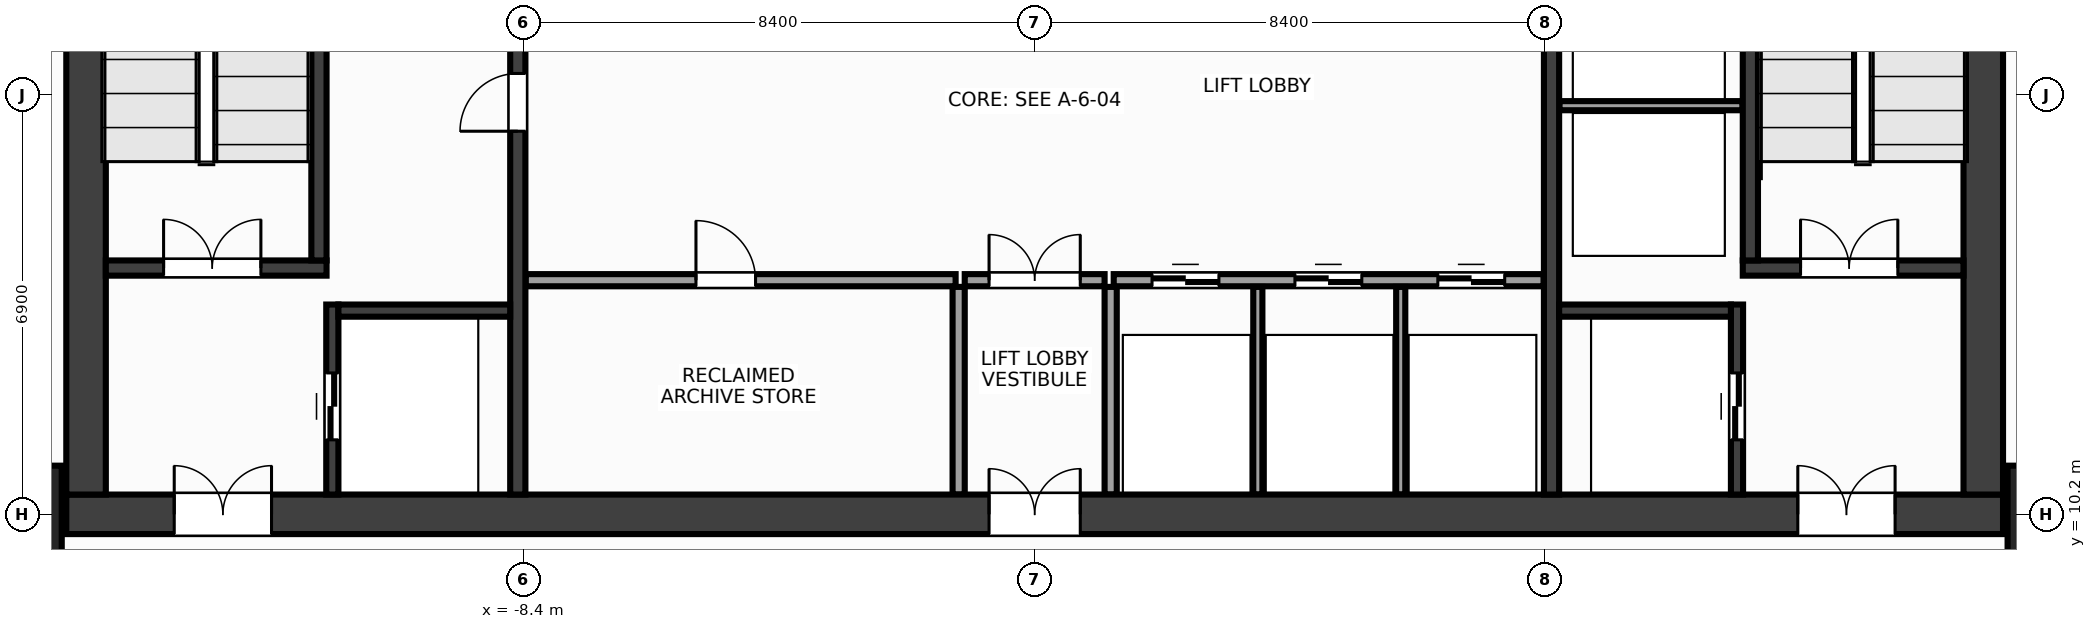
"""IFC4 building model, lengths in metres.
Left out: names, types, materials, properties, quantities, classifications, styles, units other than length and angle.
Written with IfcOpenShell. Run it as: python <this file> out.ifc"""

import sys

from ifc_helpers import new_model, si_unit, direction, frame, frame_2d, origin, origin_2d, place, context, subcontext, project, spatial, rectangle, extrude, source, transform, mapped, element, fill, save


model = new_model("IFC4")
c1 = context("Model", 3, precision=1e-05, world=origin(), true_north=direction((0.0, 1.0)))
c2 = subcontext(c1, "Body", "Model", "MODEL_VIEW")
j1 = project(units=[si_unit("LENGTHUNIT", "METRE"), si_unit("PLANEANGLEUNIT", "RADIAN")], contexts=[c1])
p1 = place(None, origin())
s1 = spatial("IfcSite", under=j1, at=p1, CompositionType="ELEMENT")
p2 = place(p1, origin())
s2 = spatial("IfcBuilding", under=s1, at=p2, CompositionType="ELEMENT")
p3 = place(p2, frame((0.0, 0.0, 106.4)))
s3 = spatial("IfcBuildingStorey", under=s2, at=p3, CompositionType="ELEMENT", Elevation=106.4)
m1 = source(origin(), c2, "Body", "SweptSolid", [
    extrude(rectangle(XDim=31.85, YDim=0.65, at=frame_2d((15.925, 0.0))), origin(), (0.0, 0.0, 1.0), 3.6),
])
p4 = place(p3, frame((-15.925, 10.2, 0.0), z_axis=(0.0, 0.0, 1.0), x_axis=(1.0, 0.0, 0.0)))
e1 = element("IfcWall", 1, at=p4, inside=s3, PredefinedType="SHEAR", context=c2, shape_type="MappedRepresentation", body=[
    mapped(m1, transform((0.0, 0.0, 0.0), x_axis=(1.0, 0.0, 0.0), y_axis=(0.0, 1.0, 0.0), z_axis=(0.0, 0.0, 1.0), scale=1.0)),
])
p5 = place(p4, frame((1.775, 0.0, 0.0)))
e2 = element("IfcOpeningElement", 2, at=p5, cuts=e1, PredefinedType="OPENING", context=c2, shape_type="SweptSolid", body=[
    extrude(rectangle(XDim=1.6, YDim=2.15, at=frame_2d((0.8, 1.075))), frame((0.0, 0.337, 0.0), z_axis=(0.0, -1.0, 0.0), x_axis=(1.0, 0.0, 0.0)), (0.0, 0.0, 1.0), 0.674),
])
p6 = place(p4, frame((28.475, 0.0, 0.0)))
e3 = element("IfcOpeningElement", 3, at=p6, cuts=e1, PredefinedType="OPENING", context=c2, shape_type="SweptSolid", body=[
    extrude(rectangle(XDim=1.6, YDim=2.15, at=frame_2d((0.8, 1.075))), frame((0.0, 0.337, 0.0), z_axis=(0.0, -1.0, 0.0), x_axis=(1.0, 0.0, 0.0)), (0.0, 0.0, 1.0), 0.674),
])
p7 = place(p4, frame((15.175, 0.0, 0.0)))
e4 = element("IfcOpeningElement", 4, at=p7, cuts=e1, PredefinedType="OPENING", context=c2, shape_type="SweptSolid", body=[
    extrude(rectangle(XDim=1.5, YDim=2.2, at=frame_2d((0.75, 1.1))), frame((0.0, 0.337, 0.0), z_axis=(0.0, -1.0, 0.0), x_axis=(1.0, 0.0, 0.0)), (0.0, 0.0, 1.0), 0.674),
])
m2 = source(origin(), c2, "Body", "SweptSolid", [
    extrude(rectangle(XDim=12.95, YDim=0.65, at=frame_2d((6.475, 0.0))), origin(), (0.0, 0.0, 1.0), 3.6),
])
for number, where, z_axis, x_axis in (
    (5, (-15.6, 10.525, 0.0), (0.0, 0.0, 1.0), (0.0, 1.0, 0.0)),
    (6, (15.6, 10.525, 0.0), (0.0, 0.0, 1.0), (0.0, 1.0, 0.0)),
):
    element("IfcWall", number, at=place(p3, frame(where, z_axis=z_axis, x_axis=x_axis)), inside=s3, PredefinedType="SHEAR", context=c2, shape_type="MappedRepresentation", body=[
        mapped(m2, transform((0.0, 0.0, 0.0), x_axis=(1.0, 0.0, 0.0), y_axis=(0.0, 1.0, 0.0), z_axis=(0.0, 0.0, 1.0), scale=1.0)),
    ])
m3 = source(origin(), c2, "Body", "SweptSolid", [
    extrude(rectangle(XDim=12.95, YDim=0.25, at=frame_2d((6.475, 0.0))), origin(), (0.0, 0.0, 1.0), 3.6),
])
p8 = place(p3, frame((-8.5, 10.525, 0.0), z_axis=(0.0, 0.0, 1.0), x_axis=(0.0, 1.0, 0.0)))
e7 = element("IfcWall", 7, at=p8, inside=s3, PredefinedType="SHEAR", context=c2, shape_type="MappedRepresentation", body=[
    mapped(m3, transform((0.0, 0.0, 0.0), x_axis=(1.0, 0.0, 0.0), y_axis=(0.0, 1.0, 0.0), z_axis=(0.0, 0.0, 1.0), scale=1.0)),
])
p9 = place(p8, frame((5.975, 0.0, 0.0)))
e8 = element("IfcOpeningElement", 8, at=p9, cuts=e7, PredefinedType="OPENING", context=c2, shape_type="SweptSolid", body=[
    extrude(rectangle(XDim=0.95, YDim=2.15, at=frame_2d((0.475, 1.075))), frame((0.0, 0.137, 0.0), z_axis=(0.0, -1.0, 0.0), x_axis=(1.0, 0.0, 0.0)), (0.0, 0.0, 1.0), 0.274),
])
p10 = place(p3, frame((8.5, 10.525, 0.0), z_axis=(0.0, 0.0, 1.0), x_axis=(0.0, 1.0, 0.0)))
e9 = element("IfcWall", 9, at=p10, inside=s3, PredefinedType="SHEAR", context=c2, shape_type="MappedRepresentation", body=[
    mapped(m3, transform((0.0, 0.0, 0.0), x_axis=(1.0, 0.0, 0.0), y_axis=(0.0, 1.0, 0.0), z_axis=(0.0, 0.0, 1.0), scale=1.0)),
])
p11 = place(p10, frame((9.925, 0.0, 0.0)))
e10 = element("IfcOpeningElement", 10, at=p11, cuts=e9, PredefinedType="OPENING", context=c2, shape_type="SweptSolid", body=[
    extrude(rectangle(XDim=0.95, YDim=2.15, at=frame_2d((0.475, 1.075))), frame((0.0, 0.137, 0.0), z_axis=(0.0, -1.0, 0.0), x_axis=(1.0, 0.0, 0.0)), (0.0, 0.0, 1.0), 0.274),
])
m4 = source(origin(), c2, "Body", "SweptSolid", [
    extrude(rectangle(XDim=3.63, YDim=0.25, at=frame_2d((1.815, 0.0))), origin(), (0.0, 0.0, 1.0), 3.6),
])
p12 = place(p3, frame((-15.275, 14.25, 0.0), z_axis=(0.0, 0.0, 1.0), x_axis=(1.0, 0.0, 0.0)))
e11 = element("IfcWall", 11, at=p12, inside=s3, PredefinedType="SHEAR", context=c2, shape_type="MappedRepresentation", body=[
    mapped(m4, transform((0.0, 0.0, 0.0), x_axis=(1.0, 0.0, 0.0), y_axis=(0.0, 1.0, 0.0), z_axis=(0.0, 0.0, 1.0), scale=1.0)),
])
p13 = place(p12, frame((0.95, 0.0, 0.0)))
e12 = element("IfcOpeningElement", 12, at=p13, cuts=e11, PredefinedType="OPENING", context=c2, shape_type="SweptSolid", body=[
    extrude(rectangle(XDim=1.6, YDim=2.15, at=frame_2d((0.8, 1.075))), frame((0.0, 0.137, 0.0), z_axis=(0.0, -1.0, 0.0), x_axis=(1.0, 0.0, 0.0)), (0.0, 0.0, 1.0), 0.274),
])
m5 = source(origin(), c2, "Body", "SweptSolid", [
    extrude(rectangle(XDim=9.1, YDim=0.25, at=frame_2d((4.55, 0.0))), origin(), (0.0, 0.0, 1.0), 3.6),
])
p14 = place(p3, frame((-11.77, 14.375, 0.0), z_axis=(0.0, 0.0, 1.0), x_axis=(0.0, 1.0, 0.0)))
e13 = element("IfcWall", 13, at=p14, inside=s3, PredefinedType="SHEAR", context=c2, shape_type="MappedRepresentation", body=[
    mapped(m5, transform((0.0, 0.0, 0.0), x_axis=(1.0, 0.0, 0.0), y_axis=(0.0, 1.0, 0.0), z_axis=(0.0, 0.0, 1.0), scale=1.0)),
])
p15 = place(p3, frame((11.645, 14.25, 0.0), z_axis=(0.0, 0.0, 1.0), x_axis=(1.0, 0.0, 0.0)))
e14 = element("IfcWall", 14, at=p15, inside=s3, PredefinedType="SHEAR", context=c2, shape_type="MappedRepresentation", body=[
    mapped(m4, transform((0.0, 0.0, 0.0), x_axis=(1.0, 0.0, 0.0), y_axis=(0.0, 1.0, 0.0), z_axis=(0.0, 0.0, 1.0), scale=1.0)),
])
p16 = place(p15, frame((0.95, 0.0, 0.0)))
e15 = element("IfcOpeningElement", 15, at=p16, cuts=e14, PredefinedType="OPENING", context=c2, shape_type="SweptSolid", body=[
    extrude(rectangle(XDim=1.6, YDim=2.15, at=frame_2d((0.8, 1.075))), frame((0.0, 0.137, 0.0), z_axis=(0.0, -1.0, 0.0), x_axis=(1.0, 0.0, 0.0)), (0.0, 0.0, 1.0), 0.274),
])
p17 = place(p3, frame((11.77, 14.375, 0.0), z_axis=(0.0, 0.0, 1.0), x_axis=(0.0, 1.0, 0.0)))
e16 = element("IfcWall", 16, at=p17, inside=s3, PredefinedType="SHEAR", context=c2, shape_type="MappedRepresentation", body=[
    mapped(m5, transform((0.0, 0.0, 0.0), x_axis=(1.0, 0.0, 0.0), y_axis=(0.0, 1.0, 0.0), z_axis=(0.0, 0.0, 1.0), scale=1.0)),
])
m6 = source(origin(), c2, "Body", "SweptSolid", [
    extrude(rectangle(XDim=3.125, YDim=0.2, at=frame_2d((1.562, 0.0))), origin(), (0.0, 0.0, 1.0), 3.6),
])
p18 = place(p3, frame((-11.55, 10.525, 0.0), z_axis=(0.0, 0.0, 1.0), x_axis=(0.0, 1.0, 0.0)))
e17 = element("IfcWall", 17, at=p18, inside=s3, PredefinedType="SHEAR", context=c2, shape_type="MappedRepresentation", body=[
    mapped(m6, transform((0.0, 0.0, 0.0), x_axis=(1.0, 0.0, 0.0), y_axis=(0.0, 1.0, 0.0), z_axis=(0.0, 0.0, 1.0), scale=1.0)),
])
p19 = place(p18, frame((0.9, 0.0, 0.0)))
e18 = element("IfcOpeningElement", 18, at=p19, cuts=e17, PredefinedType="OPENING", context=c2, shape_type="SweptSolid", body=[
    extrude(rectangle(XDim=1.1, YDim=2.15, at=frame_2d((0.55, 1.075))), frame((0.0, 0.112, 0.0), z_axis=(0.0, -1.0, 0.0), x_axis=(1.0, 0.0, 0.0)), (0.0, 0.0, 1.0), 0.224),
])
m7 = source(origin(), c2, "Body", "SweptSolid", [
    extrude(rectangle(XDim=2.825, YDim=0.2, at=frame_2d((1.413, 0.0))), origin(), (0.0, 0.0, 1.0), 3.6),
])
p20 = place(p3, frame((-11.45, 13.55, 0.0), z_axis=(0.0, 0.0, 1.0), x_axis=(1.0, 0.0, 0.0)))
e19 = element("IfcWall", 19, at=p20, inside=s3, PredefinedType="SHEAR", context=c2, shape_type="MappedRepresentation", body=[
    mapped(m7, transform((0.0, 0.0, 0.0), x_axis=(1.0, 0.0, 0.0), y_axis=(0.0, 1.0, 0.0), z_axis=(0.0, 0.0, 1.0), scale=1.0)),
])
p21 = place(p3, frame((11.55, 10.525, 0.0), z_axis=(0.0, 0.0, 1.0), x_axis=(0.0, 1.0, 0.0)))
e20 = element("IfcWall", 20, at=p21, inside=s3, PredefinedType="SHEAR", context=c2, shape_type="MappedRepresentation", body=[
    mapped(m6, transform((0.0, 0.0, 0.0), x_axis=(1.0, 0.0, 0.0), y_axis=(0.0, 1.0, 0.0), z_axis=(0.0, 0.0, 1.0), scale=1.0)),
])
p22 = place(p21, frame((0.9, 0.0, 0.0)))
e21 = element("IfcOpeningElement", 21, at=p22, cuts=e20, PredefinedType="OPENING", context=c2, shape_type="SweptSolid", body=[
    extrude(rectangle(XDim=1.1, YDim=2.15, at=frame_2d((0.55, 1.075))), frame((0.0, 0.112, 0.0), z_axis=(0.0, -1.0, 0.0), x_axis=(1.0, 0.0, 0.0)), (0.0, 0.0, 1.0), 0.224),
])
p23 = place(p3, frame((8.625, 13.55, 0.0), z_axis=(0.0, 0.0, 1.0), x_axis=(1.0, 0.0, 0.0)))
e22 = element("IfcWall", 22, at=p23, inside=s3, PredefinedType="SHEAR", context=c2, shape_type="MappedRepresentation", body=[
    mapped(m7, transform((0.0, 0.0, 0.0), x_axis=(1.0, 0.0, 0.0), y_axis=(0.0, 1.0, 0.0), z_axis=(0.0, 0.0, 1.0), scale=1.0)),
])
m8 = source(origin(), c2, "Body", "SweptSolid", [
    extrude(rectangle(XDim=1.6, YDim=1.6, at=origin_2d()), origin(), (0.0, 0.0, 1.0), 3.6),
])
for number, where, z_axis, x_axis in (
    (23, (-16.8, 10.2, 0.0), (0.0, 0.0, 1.0), (1.0, 0.0, 0.0)),
    (24, (16.8, 10.2, 0.0), (0.0, 0.0, 1.0), (1.0, 0.0, 0.0)),
):
    element("IfcColumn", number, at=place(p3, frame(where, z_axis=z_axis, x_axis=x_axis)), inside=s3, PredefinedType="COLUMN", context=c2, shape_type="MappedRepresentation", body=[
        mapped(m8, transform((0.0, 0.0, 0.0), x_axis=(1.0, 0.0, 0.0), y_axis=(0.0, 1.0, 0.0), z_axis=(0.0, 0.0, 1.0), scale=1.0)),
    ])
m9 = source(origin(), c2, "Body", "SweptSolid", [
    extrude(rectangle(XDim=3.01, YDim=0.15, at=frame_2d((1.505, 0.0))), origin(), (0.0, 0.0, 1.0), 3.36),
])
p24 = place(p3, frame((8.63, 16.92, 0.0), z_axis=(0.0, 0.0, 1.0), x_axis=(1.0, 0.0, 0.0)))
e25 = element("IfcWall", 25, at=p24, inside=s3, PredefinedType="PARTITIONING", context=c2, shape_type="MappedRepresentation", body=[
    mapped(m9, transform((0.0, 0.0, 0.0), x_axis=(1.0, 0.0, 0.0), y_axis=(0.0, 1.0, 0.0), z_axis=(0.0, 0.0, 1.0), scale=1.0)),
])
m10 = source(origin(), c2, "Body", "SweptSolid", [
    extrude(rectangle(XDim=7.07, YDim=0.2, at=frame_2d((3.535, 0.0))), origin(), (0.0, 0.0, 1.0), 3.36),
])
p25 = place(p3, frame((-8.37, 14.05, 0.0), z_axis=(0.0, 0.0, 1.0), x_axis=(1.0, 0.0, 0.0)))
e26 = element("IfcWall", 26, at=p25, inside=s3, PredefinedType="PARTITIONING", context=c2, shape_type="MappedRepresentation", body=[
    mapped(m10, transform((0.0, 0.0, 0.0), x_axis=(1.0, 0.0, 0.0), y_axis=(0.0, 1.0, 0.0), z_axis=(0.0, 0.0, 1.0), scale=1.0)),
])
p26 = place(p25, frame((2.8, 0.0, 0.0)))
e27 = element("IfcOpeningElement", 27, at=p26, cuts=e26, PredefinedType="OPENING", context=c2, shape_type="SweptSolid", body=[
    extrude(rectangle(XDim=0.98, YDim=2.15, at=frame_2d((0.49, 1.075))), frame((0.0, 0.112, 0.0), z_axis=(0.0, -1.0, 0.0), x_axis=(1.0, 0.0, 0.0)), (0.0, 0.0, 1.0), 0.224),
])
p27 = place(p3, frame((1.3, 14.05, 0.0), z_axis=(0.0, 0.0, 1.0), x_axis=(1.0, 0.0, 0.0)))
e28 = element("IfcWall", 28, at=p27, inside=s3, PredefinedType="PARTITIONING", context=c2, shape_type="MappedRepresentation", body=[
    mapped(m10, transform((0.0, 0.0, 0.0), x_axis=(1.0, 0.0, 0.0), y_axis=(0.0, 1.0, 0.0), z_axis=(0.0, 0.0, 1.0), scale=1.0)),
])
p28 = place(p27, frame((0.63, 0.0, 0.0)))
e29 = element("IfcOpeningElement", 29, at=p28, cuts=e28, PredefinedType="OPENING", context=c2, shape_type="SweptSolid", body=[
    extrude(rectangle(XDim=1.1, YDim=2.15, at=frame_2d((0.55, 1.075))), frame((0.0, 0.112, 0.0), z_axis=(0.0, -1.0, 0.0), x_axis=(1.0, 0.0, 0.0)), (0.0, 0.0, 1.0), 0.224),
])
p29 = place(p27, frame((2.98, 0.0, 0.0)))
e30 = element("IfcOpeningElement", 30, at=p29, cuts=e28, PredefinedType="OPENING", context=c2, shape_type="SweptSolid", body=[
    extrude(rectangle(XDim=1.1, YDim=2.15, at=frame_2d((0.55, 1.075))), frame((0.0, 0.112, 0.0), z_axis=(0.0, -1.0, 0.0), x_axis=(1.0, 0.0, 0.0)), (0.0, 0.0, 1.0), 0.224),
])
p30 = place(p27, frame((5.33, 0.0, 0.0)))
e31 = element("IfcOpeningElement", 31, at=p30, cuts=e28, PredefinedType="OPENING", context=c2, shape_type="SweptSolid", body=[
    extrude(rectangle(XDim=1.1, YDim=2.15, at=frame_2d((0.55, 1.075))), frame((0.0, 0.112, 0.0), z_axis=(0.0, -1.0, 0.0), x_axis=(1.0, 0.0, 0.0)), (0.0, 0.0, 1.0), 0.224),
])
m11 = source(origin(), c2, "Body", "SweptSolid", [
    extrude(rectangle(XDim=3.415, YDim=0.2, at=frame_2d((1.708, 0.0))), origin(), (0.0, 0.0, 1.0), 3.36),
])
for number, where, z_axis, x_axis in (
    (32, (-1.25, 10.525, 0.0), (0.0, 0.0, 1.0), (0.0, 1.0, 0.0)),
    (33, (1.25, 10.525, 0.0), (0.0, 0.0, 1.0), (0.0, 1.0, 0.0)),
):
    element("IfcWall", number, at=place(p3, frame(where, z_axis=z_axis, x_axis=x_axis)), inside=s3, PredefinedType="PARTITIONING", context=c2, shape_type="MappedRepresentation", body=[
        mapped(m11, transform((0.0, 0.0, 0.0), x_axis=(1.0, 0.0, 0.0), y_axis=(0.0, 1.0, 0.0), z_axis=(0.0, 0.0, 1.0), scale=1.0)),
    ])
m12 = source(origin(), c2, "Body", "SweptSolid", [
    extrude(rectangle(XDim=2.3, YDim=0.2, at=frame_2d((1.15, 0.0))), origin(), (0.0, 0.0, 1.0), 3.36),
])
p31 = place(p3, frame((-1.15, 14.05, 0.0), z_axis=(0.0, 0.0, 1.0), x_axis=(1.0, 0.0, 0.0)))
e34 = element("IfcWall", 34, at=p31, inside=s3, PredefinedType="PARTITIONING", context=c2, shape_type="MappedRepresentation", body=[
    mapped(m12, transform((0.0, 0.0, 0.0), x_axis=(1.0, 0.0, 0.0), y_axis=(0.0, 1.0, 0.0), z_axis=(0.0, 0.0, 1.0), scale=1.0)),
])
p32 = place(p31, frame((0.4, 0.0, 0.0)))
e35 = element("IfcOpeningElement", 35, at=p32, cuts=e34, PredefinedType="OPENING", context=c2, shape_type="SweptSolid", body=[
    extrude(rectangle(XDim=1.5, YDim=2.2, at=frame_2d((0.75, 1.1))), frame((0.0, 0.112, 0.0), z_axis=(0.0, -1.0, 0.0), x_axis=(1.0, 0.0, 0.0)), (0.0, 0.0, 1.0), 0.224),
])
m13 = source(origin(), c2, "Body", "SweptSolid", [
    extrude(rectangle(XDim=3.415, YDim=0.15, at=frame_2d((1.708, 0.0))), origin(), (0.0, 0.0, 1.0), 3.36),
])
for number, where, z_axis, x_axis in (
    (36, (3.67, 10.525, 0.0), (0.0, 0.0, 1.0), (0.0, 1.0, 0.0)),
    (37, (6.02, 10.525, 0.0), (0.0, 0.0, 1.0), (0.0, 1.0, 0.0)),
):
    element("IfcWall", number, at=place(p3, frame(where, z_axis=z_axis, x_axis=x_axis)), inside=s3, PredefinedType="PARTITIONING", context=c2, shape_type="MappedRepresentation", body=[
        mapped(m13, transform((0.0, 0.0, 0.0), x_axis=(1.0, 0.0, 0.0), y_axis=(0.0, 1.0, 0.0), z_axis=(0.0, 0.0, 1.0), scale=1.0)),
    ])
m14 = source(origin(), c2, "Body", "SweptSolid", [
    extrude(rectangle(XDim=1.6, YDim=2.15, at=frame_2d((0.8, 1.075))), frame((0.0, 0.025, 0.0), z_axis=(0.0, -1.0, 0.0), x_axis=(1.0, 0.0, 0.0)), (0.0, 0.0, 1.0), 0.05),
])
p33 = place(p13, origin())
e38 = element("IfcDoor", 38, at=p33, inside=s3, OperationType="DOUBLE_DOOR_SINGLE_SWING", PredefinedType="DOOR", context=c2, shape_type="MappedRepresentation", body=[
    mapped(m14, transform((0.0, 0.0, 0.0), x_axis=(1.0, 0.0, 0.0), y_axis=(0.0, 1.0, 0.0), z_axis=(0.0, 0.0, 1.0), scale=1.0)),
])
fill(e12, e38)
p34 = place(p16, origin())
e39 = element("IfcDoor", 39, at=p34, inside=s3, OperationType="DOUBLE_DOOR_SINGLE_SWING", PredefinedType="DOOR", context=c2, shape_type="MappedRepresentation", body=[
    mapped(m14, transform((0.0, 0.0, 0.0), x_axis=(1.0, 0.0, 0.0), y_axis=(0.0, 1.0, 0.0), z_axis=(0.0, 0.0, 1.0), scale=1.0)),
])
fill(e15, e39)
p35 = place(p5, origin())
e40 = element("IfcDoor", 40, at=p35, inside=s3, OperationType="DOUBLE_DOOR_SINGLE_SWING", PredefinedType="DOOR", context=c2, shape_type="MappedRepresentation", body=[
    mapped(m14, transform((0.0, 0.0, 0.0), x_axis=(1.0, 0.0, 0.0), y_axis=(0.0, 1.0, 0.0), z_axis=(0.0, 0.0, 1.0), scale=1.0)),
])
fill(e2, e40)
p36 = place(p6, origin())
e41 = element("IfcDoor", 41, at=p36, inside=s3, OperationType="DOUBLE_DOOR_SINGLE_SWING", PredefinedType="DOOR", context=c2, shape_type="MappedRepresentation", body=[
    mapped(m14, transform((0.0, 0.0, 0.0), x_axis=(1.0, 0.0, 0.0), y_axis=(0.0, 1.0, 0.0), z_axis=(0.0, 0.0, 1.0), scale=1.0)),
])
fill(e3, e41)
m15 = source(origin(), c2, "Body", "SweptSolid", [
    extrude(rectangle(XDim=1.1, YDim=2.15, at=frame_2d((0.55, 1.075))), frame((0.0, 0.025, 0.0), z_axis=(0.0, -1.0, 0.0), x_axis=(1.0, 0.0, 0.0)), (0.0, 0.0, 1.0), 0.05),
])
p37 = place(p19, origin())
e42 = element("IfcDoor", 42, at=p37, inside=s3, OperationType="DOUBLE_DOOR_SLIDING", PredefinedType="DOOR", context=c2, shape_type="MappedRepresentation", body=[
    mapped(m15, transform((0.0, 0.0, 0.0), x_axis=(1.0, 0.0, 0.0), y_axis=(0.0, 1.0, 0.0), z_axis=(0.0, 0.0, 1.0), scale=1.0)),
])
fill(e18, e42)
p38 = place(p22, origin())
e43 = element("IfcDoor", 43, at=p38, inside=s3, OperationType="DOUBLE_DOOR_SLIDING", PredefinedType="DOOR", context=c2, shape_type="MappedRepresentation", body=[
    mapped(m15, transform((0.0, 0.0, 0.0), x_axis=(1.0, 0.0, 0.0), y_axis=(0.0, 1.0, 0.0), z_axis=(0.0, 0.0, 1.0), scale=1.0)),
])
fill(e21, e43)
m16 = source(origin(), c2, "Body", "SweptSolid", [
    extrude(rectangle(XDim=0.95, YDim=2.15, at=frame_2d((0.475, 1.075))), frame((0.0, 0.025, 0.0), z_axis=(0.0, -1.0, 0.0), x_axis=(1.0, 0.0, 0.0)), (0.0, 0.0, 1.0), 0.05),
])
p39 = place(p9, origin())
e44 = element("IfcDoor", 44, at=p39, inside=s3, OperationType="SINGLE_SWING_LEFT", PredefinedType="DOOR", context=c2, shape_type="MappedRepresentation", body=[
    mapped(m16, transform((0.0, 0.0, 0.0), x_axis=(1.0, 0.0, 0.0), y_axis=(0.0, 1.0, 0.0), z_axis=(0.0, 0.0, 1.0), scale=1.0)),
])
fill(e8, e44)
m17 = source(origin(), c2, "Body", "SweptSolid", [
    extrude(rectangle(XDim=0.98, YDim=2.15, at=frame_2d((0.49, 1.075))), frame((0.0, 0.025, 0.0), z_axis=(0.0, -1.0, 0.0), x_axis=(1.0, 0.0, 0.0)), (0.0, 0.0, 1.0), 0.05),
])
p40 = place(p26, origin())
e45 = element("IfcDoor", 45, at=p40, inside=s3, OperationType="SINGLE_SWING_LEFT", PredefinedType="DOOR", context=c2, shape_type="MappedRepresentation", body=[
    mapped(m17, transform((0.0, 0.0, 0.0), x_axis=(1.0, 0.0, 0.0), y_axis=(0.0, 1.0, 0.0), z_axis=(0.0, 0.0, 1.0), scale=1.0)),
])
fill(e27, e45)
p41 = place(p28, origin())
e46 = element("IfcDoor", 46, at=p41, inside=s3, OperationType="DOUBLE_DOOR_SLIDING", PredefinedType="DOOR", context=c2, shape_type="MappedRepresentation", body=[
    mapped(m15, transform((0.0, 0.0, 0.0), x_axis=(1.0, 0.0, 0.0), y_axis=(0.0, 1.0, 0.0), z_axis=(0.0, 0.0, 1.0), scale=1.0)),
])
fill(e29, e46)
p42 = place(p29, origin())
e47 = element("IfcDoor", 47, at=p42, inside=s3, OperationType="DOUBLE_DOOR_SLIDING", PredefinedType="DOOR", context=c2, shape_type="MappedRepresentation", body=[
    mapped(m15, transform((0.0, 0.0, 0.0), x_axis=(1.0, 0.0, 0.0), y_axis=(0.0, 1.0, 0.0), z_axis=(0.0, 0.0, 1.0), scale=1.0)),
])
fill(e30, e47)
p43 = place(p30, origin())
e48 = element("IfcDoor", 48, at=p43, inside=s3, OperationType="DOUBLE_DOOR_SLIDING", PredefinedType="DOOR", context=c2, shape_type="MappedRepresentation", body=[
    mapped(m15, transform((0.0, 0.0, 0.0), x_axis=(1.0, 0.0, 0.0), y_axis=(0.0, 1.0, 0.0), z_axis=(0.0, 0.0, 1.0), scale=1.0)),
])
fill(e31, e48)
m18 = source(origin(), c2, "Body", "SweptSolid", [
    extrude(rectangle(XDim=1.5, YDim=2.2, at=frame_2d((0.75, 1.1))), frame((0.0, 0.025, 0.0), z_axis=(0.0, -1.0, 0.0), x_axis=(1.0, 0.0, 0.0)), (0.0, 0.0, 1.0), 0.05),
])
p44 = place(p32, origin())
e49 = element("IfcDoor", 49, at=p44, inside=s3, OperationType="DOUBLE_DOOR_SINGLE_SWING", PredefinedType="DOOR", context=c2, shape_type="MappedRepresentation", body=[
    mapped(m18, transform((0.0, 0.0, 0.0), x_axis=(1.0, 0.0, 0.0), y_axis=(0.0, 1.0, 0.0), z_axis=(0.0, 0.0, 1.0), scale=1.0)),
])
fill(e35, e49)
p45 = place(p7, origin())
e50 = element("IfcDoor", 50, at=p45, inside=s3, OperationType="DOUBLE_DOOR_SINGLE_SWING", PredefinedType="DOOR", context=c2, shape_type="MappedRepresentation", body=[
    mapped(m18, transform((0.0, 0.0, 0.0), x_axis=(1.0, 0.0, 0.0), y_axis=(0.0, 1.0, 0.0), z_axis=(0.0, 0.0, 1.0), scale=1.0)),
])
fill(e4, e50)
save(model, sys.argv[1])
